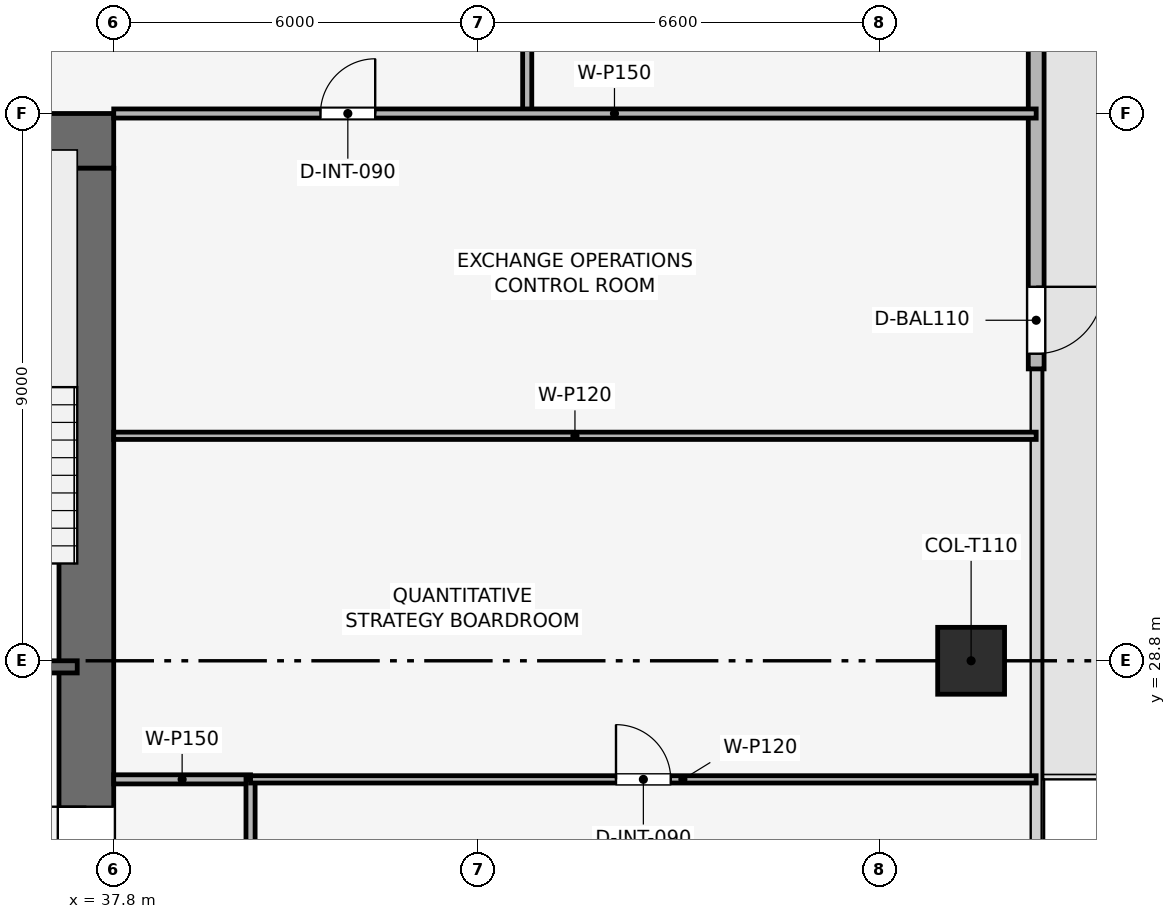
"""IFC4 building model, lengths in metres.
Left out: names, types, materials, properties, quantities, classifications, styles, units other than length and angle.
Written with IfcOpenShell. Run it as: python <this file> out.ifc"""

import sys

from ifc_helpers import new_model, si_unit, direction, frame, frame_2d, origin, origin_2d, place, context, subcontext, project, spatial, rectangle, extrude, element, fill, save


model = new_model("IFC4")
c1 = context("Model", 3, precision=1e-05, world=origin(), true_north=direction((0.0, 1.0)))
c2 = subcontext(c1, "Body", "Model", "MODEL_VIEW")
j1 = project(units=[si_unit("LENGTHUNIT", "METRE"), si_unit("PLANEANGLEUNIT", "RADIAN")], contexts=[c1])
p1 = place(None, origin())
s1 = spatial("IfcSite", under=j1, at=p1, CompositionType="ELEMENT")
p2 = place(p1, origin())
s2 = spatial("IfcBuilding", under=s1, at=p2, CompositionType="ELEMENT")
p3 = place(p2, frame((0.0, 0.0, 142.05)))
s3 = spatial("IfcBuildingStorey", under=s2, at=p3, CompositionType="ELEMENT", Elevation=142.05)
p4 = place(p3, frame((19.8, 37.35, 0.0), z_axis=(0.0, 0.0, 1.0), x_axis=(1.0, 0.0, 0.0)))
e1 = element("IfcWall", 1, at=p4, inside=s3, PredefinedType="SHEAR", context=c2, shape_type="SweptSolid", body=[
    extrude(rectangle(XDim=18.0, YDim=0.9, at=frame_2d((9.0, 0.0))), origin(), (0.0, 0.0, 1.0), 3.75),
])
p5 = place(p4, frame((7.05, 0.0, 0.0)))
e2 = element("IfcOpeningElement", 2, at=p5, cuts=e1, PredefinedType="OPENING", context=c2, shape_type="SweptSolid", body=[
    extrude(rectangle(XDim=1.1, YDim=2.15, at=frame_2d((0.55, 1.075))), frame((0.0, 0.46, 0.0), z_axis=(0.0, -1.0, 0.0), x_axis=(1.0, 0.0, 0.0)), (0.0, 0.0, 1.0), 0.92),
])
p6 = place(p3, frame((37.35, 20.7, 0.0), z_axis=(0.0, 0.0, 1.0), x_axis=(0.0, 1.0, 0.0)))
e3 = element("IfcWall", 3, at=p6, inside=s3, PredefinedType="SHEAR", context=c2, shape_type="SweptSolid", body=[
    extrude(rectangle(XDim=16.2, YDim=0.9, at=frame_2d((8.1, 0.0))), origin(), (0.0, 0.0, 1.0), 3.75),
])
p7 = place(p6, frame((4.6, 0.0, 0.0)))
e4 = element("IfcOpeningElement", 4, at=p7, cuts=e3, PredefinedType="OPENING", context=c2, shape_type="SweptSolid", body=[
    extrude(rectangle(XDim=1.1, YDim=2.15, at=frame_2d((0.55, 1.075))), frame((0.0, 0.46, 0.0), z_axis=(0.0, -1.0, 0.0), x_axis=(1.0, 0.0, 0.0)), (0.0, 0.0, 1.0), 0.92),
])
p8 = place(p3, frame((51.9, 28.8, 0.003), z_axis=(0.0, 0.0, 1.0), x_axis=(1.0, 0.0, 0.0)))
e5 = element("IfcColumn", 5, at=p8, inside=s3, PredefinedType="COLUMN", context=c2, shape_type="SweptSolid", body=[
    extrude(rectangle(XDim=1.1, YDim=1.1, at=origin_2d()), origin(), (0.0, 0.0, 1.0), 3.489),
])
p9 = place(p3, frame((52.97, 46.2, 0.0), z_axis=(0.0, 0.0, 1.0), x_axis=(0.0, -1.0, 0.0)))
e6 = element("IfcWall", 6, at=p9, inside=s3, PredefinedType="SOLIDWALL", context=c2, shape_type="SweptSolid", body=[
    extrude(rectangle(XDim=12.6, YDim=0.26, at=frame_2d((6.3, 0.0))), origin(), (0.0, 0.0, 1.0), 3.495),
])
p10 = place(p9, frame((11.25, 0.0, 0.0)))
e7 = element("IfcOpeningElement", 7, at=p10, cuts=e6, PredefinedType="OPENING", context=c2, shape_type="SweptSolid", body=[
    extrude(rectangle(XDim=1.1, YDim=2.2, at=frame_2d((0.55, 1.1))), frame((0.0, 0.14, 0.0), z_axis=(0.0, -1.0, 0.0), x_axis=(1.0, 0.0, 0.0)), (0.0, 0.0, 1.0), 0.28),
])
p11 = place(p3, frame((34.05, 28.7, 0.0), z_axis=(0.0, 0.0, 1.0), x_axis=(1.0, 0.0, 0.0)))
e8 = element("IfcWall", 8, at=p11, inside=s3, PredefinedType="SHEAR", context=c2, shape_type="SweptSolid", body=[
    extrude(rectangle(XDim=3.15, YDim=0.2, at=frame_2d((1.575, 0.0))), origin(), (0.0, 0.0, 1.0), 3.495),
])
p12 = place(p11, frame((0.8, 0.0, 0.0)))
e9 = element("IfcOpeningElement", 9, at=p12, cuts=e8, PredefinedType="OPENING", context=c2, shape_type="SweptSolid", body=[
    extrude(rectangle(XDim=1.0, YDim=2.1, at=frame_2d((0.5, 1.05))), frame((0.0, 0.11, 0.0), z_axis=(0.0, -1.0, 0.0), x_axis=(1.0, 0.0, 0.0)), (0.0, 0.0, 1.0), 0.22),
])
p13 = place(p3, frame((37.8, 26.85, 0.0), z_axis=(0.0, 0.0, 1.0), x_axis=(1.0, 0.0, 0.0)))
e10 = element("IfcWall", 10, at=p13, inside=s3, PredefinedType="PARTITIONING", context=c2, shape_type="SweptSolid", body=[
    extrude(rectangle(XDim=2.25, YDim=0.15, at=frame_2d((1.125, 0.0))), origin(), (0.0, 0.0, 1.0), 3.495),
])
p14 = place(p3, frame((40.05, 19.8, 0.0), z_axis=(0.0, 0.0, 1.0), x_axis=(0.0, 1.0, 0.0)))
e11 = element("IfcWall", 11, at=p14, inside=s3, PredefinedType="PARTITIONING", context=c2, shape_type="SweptSolid", body=[
    extrude(rectangle(XDim=7.05, YDim=0.15, at=frame_2d((3.525, 0.0))), origin(), (0.0, 0.0, 1.0), 3.03),
])
p15 = place(p3, frame((40.05, 26.85, 0.0), z_axis=(0.0, 0.0, 1.0), x_axis=(1.0, 0.0, 0.0)))
e12 = element("IfcWall", 12, at=p15, inside=s3, PredefinedType="PARTITIONING", context=c2, shape_type="SweptSolid", body=[
    extrude(rectangle(XDim=12.92, YDim=0.12, at=frame_2d((6.46, 0.0))), origin(), (0.0, 0.0, 1.0), 2.98),
])
p16 = place(p15, frame((6.01, 0.0, 0.0)))
e13 = element("IfcOpeningElement", 13, at=p16, cuts=e12, PredefinedType="OPENING", context=c2, shape_type="SweptSolid", body=[
    extrude(rectangle(XDim=0.9, YDim=2.1, at=frame_2d((0.45, 1.05))), frame((0.0, 0.07, 0.0), z_axis=(0.0, -1.0, 0.0), x_axis=(1.0, 0.0, 0.0)), (0.0, 0.0, 1.0), 0.14),
])
p17 = place(p3, frame((37.8, 32.5, 0.0), z_axis=(0.0, 0.0, 1.0), x_axis=(1.0, 0.0, 0.0)))
e14 = element("IfcWall", 14, at=p17, inside=s3, PredefinedType="PARTITIONING", context=c2, shape_type="SweptSolid", body=[
    extrude(rectangle(XDim=15.17, YDim=0.12, at=frame_2d((7.585, 0.0))), origin(), (0.0, 0.0, 1.0), 2.98),
])
p18 = place(p3, frame((44.6, 37.8, 0.0), z_axis=(0.0, 0.0, 1.0), x_axis=(0.0, 1.0, 0.0)))
e15 = element("IfcWall", 15, at=p18, inside=s3, PredefinedType="PARTITIONING", context=c2, shape_type="SweptSolid", body=[
    extrude(rectangle(XDim=2.4, YDim=0.15, at=frame_2d((1.2, 0.0))), origin(), (0.0, 0.0, 1.0), 3.495),
])
p19 = place(p3, frame((37.8, 37.8, 0.0), z_axis=(0.0, 0.0, 1.0), x_axis=(1.0, 0.0, 0.0)))
e16 = element("IfcWall", 16, at=p19, inside=s3, PredefinedType="PARTITIONING", context=c2, shape_type="SweptSolid", body=[
    extrude(rectangle(XDim=15.17, YDim=0.15, at=frame_2d((7.585, 0.0))), origin(), (0.0, 0.0, 1.0), 2.98),
])
p20 = place(p19, frame((3.4, 0.0, 0.0)))
e17 = element("IfcOpeningElement", 17, at=p20, cuts=e16, PredefinedType="OPENING", context=c2, shape_type="SweptSolid", body=[
    extrude(rectangle(XDim=0.9, YDim=2.1, at=frame_2d((0.45, 1.05))), frame((0.0, 0.085, 0.0), z_axis=(0.0, -1.0, 0.0), x_axis=(1.0, 0.0, 0.0)), (0.0, 0.0, 1.0), 0.17),
])
p21 = place(p10, origin())
e18 = element("IfcDoor", 18, at=p21, inside=s3, OperationType="SINGLE_SWING_LEFT", PredefinedType="DOOR", context=c2, shape_type="SweptSolid", body=[
    extrude(rectangle(XDim=1.1, YDim=2.2, at=frame_2d((0.55, 1.1))), frame((0.0, 0.025, 0.0), z_axis=(0.0, -1.0, 0.0), x_axis=(1.0, 0.0, 0.0)), (0.0, 0.0, 1.0), 0.05),
])
fill(e7, e18)
p22 = place(p16, origin())
e19 = element("IfcDoor", 19, at=p22, inside=s3, OperationType="SINGLE_SWING_LEFT", PredefinedType="DOOR", context=c2, shape_type="SweptSolid", body=[
    extrude(rectangle(XDim=0.9, YDim=2.1, at=frame_2d((0.45, 1.05))), frame((0.0, 0.025, 0.0), z_axis=(0.0, -1.0, 0.0), x_axis=(1.0, 0.0, 0.0)), (0.0, 0.0, 1.0), 0.05),
])
fill(e13, e19)
p23 = place(p20, origin())
e20 = element("IfcDoor", 20, at=p23, inside=s3, OperationType="SINGLE_SWING_RIGHT", PredefinedType="DOOR", context=c2, shape_type="SweptSolid", body=[
    extrude(rectangle(XDim=0.9, YDim=2.1, at=frame_2d((0.45, 1.05))), frame((0.0, 0.025, 0.0), z_axis=(0.0, -1.0, 0.0), x_axis=(1.0, 0.0, 0.0)), (0.0, 0.0, 1.0), 0.05),
])
fill(e17, e20)
p24 = place(p7, origin())
e21 = element("IfcDoor", 21, at=p24, inside=s3, OperationType="SINGLE_SWING_RIGHT", PredefinedType="DOOR", context=c2, shape_type="SweptSolid", body=[
    extrude(rectangle(XDim=1.1, YDim=2.15, at=frame_2d((0.55, 1.075))), frame((0.0, 0.025, 0.0), z_axis=(0.0, -1.0, 0.0), x_axis=(1.0, 0.0, 0.0)), (0.0, 0.0, 1.0), 0.05),
])
fill(e4, e21)
save(model, sys.argv[1])
